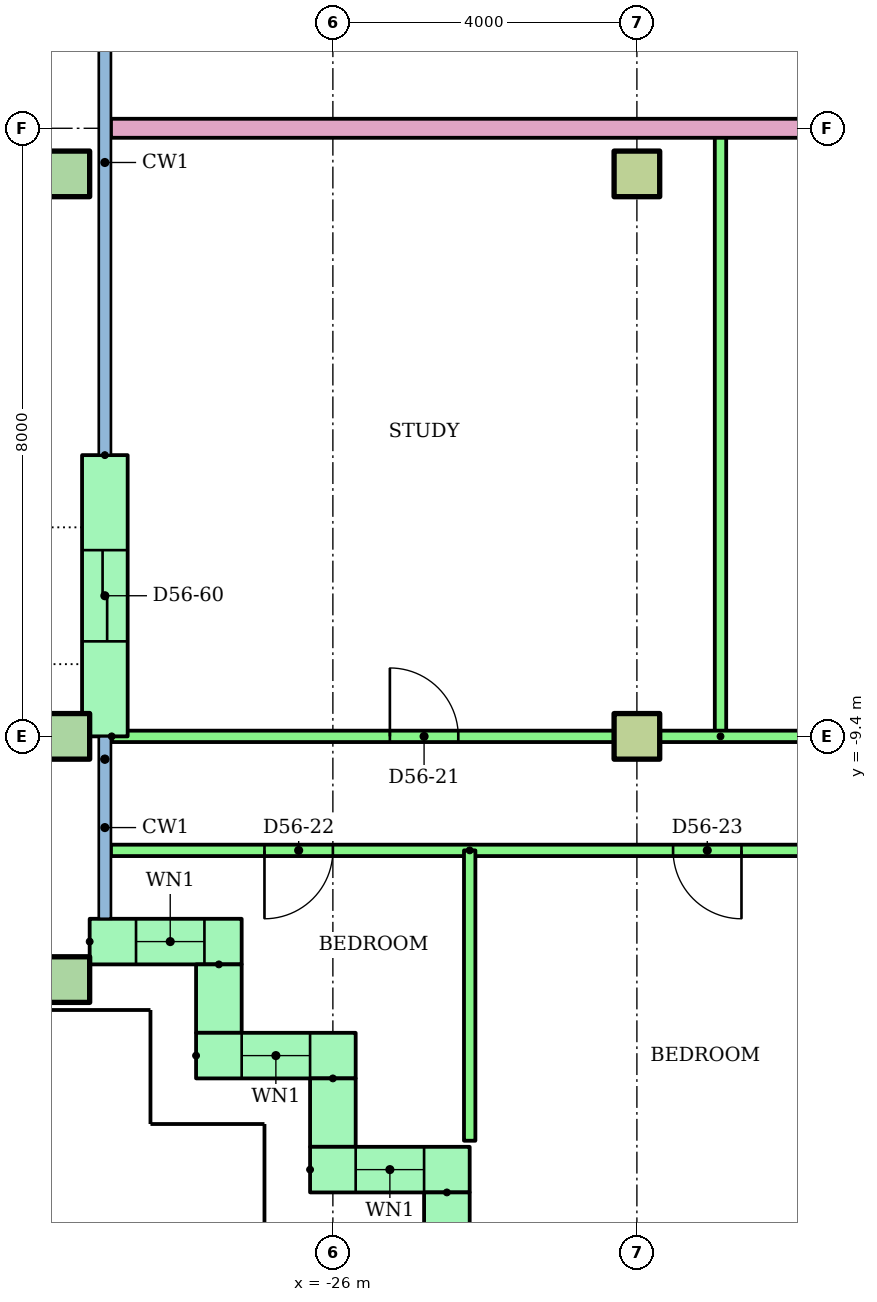
"""IFC4 building model, lengths in metres.
Left out: names, types, materials, properties, quantities, classifications, styles, units other than length and angle.
Written with IfcOpenShell. Run it as: python <this file> out.ifc"""

import sys

from ifc_helpers import new_model, si_unit, direction, frame, frame_2d, origin, origin_2d, place, context, subcontext, project, spatial, rectangle, hollow_rectangle, extrude, element, fill, save


model = new_model("IFC4")
c1 = context("Model", 3, precision=1e-05, world=origin(), true_north=direction((0.0, 1.0)))
c2 = subcontext(c1, "Body", "Model", "MODEL_VIEW")
j1 = project(units=[si_unit("LENGTHUNIT", "METRE"), si_unit("PLANEANGLEUNIT", "RADIAN")], contexts=[c1])
p1 = place(None, origin())
s1 = spatial("IfcSite", under=j1, at=p1, CompositionType="ELEMENT")
p2 = place(p1, origin())
s2 = spatial("IfcBuilding", under=s1, at=p2, CompositionType="ELEMENT")
p3 = place(p2, frame((0.0, 0.0, 217.2)))
s3 = spatial("IfcBuildingStorey", under=s2, at=p3, CompositionType="ELEMENT", Elevation=217.2)
for number, where in (
    (1, (-29.5, -12.6, 0.0)),
    (2, (-29.5, -9.4, 0.0)),
):
    element("IfcColumn", number, at=place(p3, frame(where)), inside=s3, PredefinedType="COLUMN", context=c2, shape_type="SweptSolid", body=[
        extrude(hollow_rectangle(XDim=0.6, YDim=0.6, WallThickness=0.03, at=origin_2d()), origin(), (0.0, 0.0, 1.0), 3.2),
    ])
p4 = place(p3, frame((-22.0, -9.4, 0.0)))
e3 = element("IfcColumn", 3, at=p4, inside=s3, PredefinedType="COLUMN", context=c2, shape_type="SweptSolid", body=[
    extrude(rectangle(XDim=0.6, YDim=0.6, at=origin_2d()), origin(), (0.0, 0.0, 1.0), 3.2),
])
p5 = place(p3, frame((-29.5, -2.0, 0.0)))
e4 = element("IfcColumn", 4, at=p5, inside=s3, PredefinedType="COLUMN", context=c2, shape_type="SweptSolid", body=[
    extrude(hollow_rectangle(XDim=0.6, YDim=0.6, WallThickness=0.03, at=origin_2d()), origin(), (0.0, 0.0, 1.0), 3.2),
])
p6 = place(p3, frame((-22.0, -2.0, 0.0)))
e5 = element("IfcColumn", 5, at=p6, inside=s3, PredefinedType="COLUMN", context=c2, shape_type="SweptSolid", body=[
    extrude(rectangle(XDim=0.6, YDim=0.6, at=origin_2d()), origin(), (0.0, 0.0, 1.0), 3.2),
])
p7 = place(p3, frame((-29.0, -5.7, 0.0), z_axis=(0.0, 0.0, 1.0), x_axis=(0.0, -1.0, 0.0)))
e6 = element("IfcWall", 6, at=p7, inside=s3, PredefinedType="STANDARD", context=c2, shape_type="SweptSolid", body=[
    extrude(rectangle(XDim=3.7, YDim=0.6, at=frame_2d((1.85, 0.0))), origin(), (0.0, 0.0, 1.0), 2.92),
])
p8 = place(p7, frame((1.25, 0.0, 0.0)))
e7 = element("IfcOpeningElement", 7, at=p8, cuts=e6, PredefinedType="OPENING", context=c2, shape_type="SweptSolid", body=[
    extrude(rectangle(XDim=1.2, YDim=2.1, at=frame_2d((0.6, 1.05))), frame((0.0, 0.31, 0.0), z_axis=(0.0, -1.0, 0.0), x_axis=(1.0, 0.0, 0.0)), (0.0, 0.0, 1.0), 0.62),
])
p9 = place(p3, frame((-29.2, -12.1, 0.0)))
e8 = element("IfcWall", 8, at=p9, inside=s3, PredefinedType="STANDARD", context=c2, shape_type="SweptSolid", body=[
    extrude(rectangle(XDim=2.0, YDim=0.6, at=frame_2d((1.0, 0.0))), origin(), (0.0, 0.0, 1.0), 2.92),
])
p10 = place(p9, frame((0.61, 0.0, 0.9)))
e9 = element("IfcOpeningElement", 9, at=p10, cuts=e8, PredefinedType="OPENING", context=c2, shape_type="SweptSolid", body=[
    extrude(rectangle(XDim=0.9, YDim=1.5, at=frame_2d((0.45, 0.75))), frame((0.0, 0.31, 0.0), z_axis=(0.0, -1.0, 0.0), x_axis=(1.0, 0.0, 0.0)), (0.0, 0.0, 1.0), 0.62),
])
p11 = place(p3, frame((-27.5, -12.4, 0.0), z_axis=(0.0, 0.0, 1.0), x_axis=(0.0, -1.0, 0.0)))
e10 = element("IfcWall", 10, at=p11, inside=s3, PredefinedType="STANDARD", context=c2, shape_type="SweptSolid", body=[
    extrude(rectangle(XDim=0.9, YDim=0.6, at=frame_2d((0.45, 0.0))), origin(), (0.0, 0.0, 1.0), 2.92),
])
p12 = place(p3, frame((-27.8, -13.6, 0.0)))
e11 = element("IfcWall", 11, at=p12, inside=s3, PredefinedType="STANDARD", context=c2, shape_type="SweptSolid", body=[
    extrude(rectangle(XDim=2.1, YDim=0.6, at=frame_2d((1.05, 0.0))), origin(), (0.0, 0.0, 1.0), 2.92),
])
p13 = place(p12, frame((0.6, 0.0, 0.9)))
e12 = element("IfcOpeningElement", 12, at=p13, cuts=e11, PredefinedType="OPENING", context=c2, shape_type="SweptSolid", body=[
    extrude(rectangle(XDim=0.9, YDim=1.5, at=frame_2d((0.45, 0.75))), frame((0.0, 0.31, 0.0), z_axis=(0.0, -1.0, 0.0), x_axis=(1.0, 0.0, 0.0)), (0.0, 0.0, 1.0), 0.62),
])
p14 = place(p3, frame((-26.0, -13.9, 0.0), z_axis=(0.0, 0.0, 1.0), x_axis=(0.0, -1.0, 0.0)))
e13 = element("IfcWall", 13, at=p14, inside=s3, PredefinedType="STANDARD", context=c2, shape_type="SweptSolid", body=[
    extrude(rectangle(XDim=0.9, YDim=0.6, at=frame_2d((0.45, 0.0))), origin(), (0.0, 0.0, 1.0), 2.92),
])
p15 = place(p3, frame((-26.3, -15.1, 0.0)))
e14 = element("IfcWall", 14, at=p15, inside=s3, PredefinedType="STANDARD", context=c2, shape_type="SweptSolid", body=[
    extrude(rectangle(XDim=2.1, YDim=0.6, at=frame_2d((1.05, 0.0))), origin(), (0.0, 0.0, 1.0), 2.92),
])
p16 = place(p15, frame((0.6, 0.0, 0.9)))
e15 = element("IfcOpeningElement", 15, at=p16, cuts=e14, PredefinedType="OPENING", context=c2, shape_type="SweptSolid", body=[
    extrude(rectangle(XDim=0.9, YDim=1.5, at=frame_2d((0.45, 0.75))), frame((0.0, 0.31, 0.0), z_axis=(0.0, -1.0, 0.0), x_axis=(1.0, 0.0, 0.0)), (0.0, 0.0, 1.0), 0.62),
])
p17 = place(p3, frame((-24.5, -15.4, 0.0), z_axis=(0.0, 0.0, 1.0), x_axis=(0.0, -1.0, 0.0)))
e16 = element("IfcWall", 16, at=p17, inside=s3, PredefinedType="STANDARD", context=c2, shape_type="SweptSolid", body=[
    extrude(rectangle(XDim=1.4, YDim=0.6, at=frame_2d((0.7, 0.0))), origin(), (0.0, 0.0, 1.0), 2.92),
])
p18 = place(p3, frame((-20.9, -9.4, 0.0), z_axis=(0.0, 0.0, 1.0), x_axis=(0.0, 1.0, 0.0)))
e17 = element("IfcWall", 17, at=p18, inside=s3, PredefinedType="PARTITIONING", context=c2, shape_type="SweptSolid", body=[
    extrude(rectangle(XDim=8.0, YDim=0.15, at=frame_2d((4.0, 0.0))), origin(), (0.0, 0.0, 1.0), 2.4),
])
p19 = place(p3, frame((-28.91, -9.4, 0.0)))
e18 = element("IfcWall", 18, at=p19, inside=s3, PredefinedType="PARTITIONING", context=c2, shape_type="SweptSolid", body=[
    extrude(rectangle(XDim=20.91, YDim=0.15, at=frame_2d((10.455, 0.0))), origin(), (0.0, 0.0, 1.0), 2.4),
])
p20 = place(p19, frame((15.81, 0.0, 0.0)))
e19 = element("IfcOpeningElement", 19, at=p20, cuts=e18, PredefinedType="OPENING", context=c2, shape_type="SweptSolid", body=[
    extrude(rectangle(XDim=0.9, YDim=2.1, at=frame_2d((0.45, 1.05))), frame((0.0, 0.085, 0.0), z_axis=(0.0, -1.0, 0.0), x_axis=(1.0, 0.0, 0.0)), (0.0, 0.0, 1.0), 0.17),
])
p21 = place(p19, frame((10.56, 0.0, 0.0)))
e20 = element("IfcOpeningElement", 20, at=p21, cuts=e18, PredefinedType="OPENING", context=c2, shape_type="SweptSolid", body=[
    extrude(rectangle(XDim=0.9, YDim=2.1, at=frame_2d((0.45, 1.05))), frame((0.0, 0.085, 0.0), z_axis=(0.0, -1.0, 0.0), x_axis=(1.0, 0.0, 0.0)), (0.0, 0.0, 1.0), 0.17),
])
p22 = place(p19, frame((3.66, 0.0, 0.0)))
e21 = element("IfcOpeningElement", 21, at=p22, cuts=e18, PredefinedType="OPENING", context=c2, shape_type="SweptSolid", body=[
    extrude(rectangle(XDim=0.9, YDim=2.1, at=frame_2d((0.45, 1.05))), frame((0.0, 0.085, 0.0), z_axis=(0.0, -1.0, 0.0), x_axis=(1.0, 0.0, 0.0)), (0.0, 0.0, 1.0), 0.17),
])
p23 = place(p3, frame((-6.0, -10.9, 0.0), z_axis=(0.0, 0.0, 1.0), x_axis=(-1.0, 0.0, 0.0)))
e22 = element("IfcWall", 22, at=p23, inside=s3, PredefinedType="PARTITIONING", context=c2, shape_type="SweptSolid", body=[
    extrude(rectangle(XDim=22.92, YDim=0.15, at=frame_2d((11.46, 0.0))), origin(), (0.0, 0.0, 1.0), 2.4),
])
p24 = place(p23, frame((20.0, 0.0, 0.0)))
e23 = element("IfcOpeningElement", 23, at=p24, cuts=e22, PredefinedType="OPENING", context=c2, shape_type="SweptSolid", body=[
    extrude(rectangle(XDim=0.9, YDim=2.1, at=frame_2d((0.45, 1.05))), frame((0.0, 0.085, 0.0), z_axis=(0.0, -1.0, 0.0), x_axis=(1.0, 0.0, 0.0)), (0.0, 0.0, 1.0), 0.17),
])
p25 = place(p23, frame((14.624, 0.0, 0.0)))
e24 = element("IfcOpeningElement", 24, at=p25, cuts=e22, PredefinedType="OPENING", context=c2, shape_type="SweptSolid", body=[
    extrude(rectangle(XDim=0.9, YDim=2.1, at=frame_2d((0.45, 1.05))), frame((0.0, 0.085, 0.0), z_axis=(0.0, -1.0, 0.0), x_axis=(1.0, 0.0, 0.0)), (0.0, 0.0, 1.0), 0.17),
])
p26 = place(p23, frame((9.55, 0.0, 0.0)))
e25 = element("IfcOpeningElement", 25, at=p26, cuts=e22, PredefinedType="OPENING", context=c2, shape_type="SweptSolid", body=[
    extrude(rectangle(XDim=0.9, YDim=2.1, at=frame_2d((0.45, 1.05))), frame((0.0, 0.085, 0.0), z_axis=(0.0, -1.0, 0.0), x_axis=(1.0, 0.0, 0.0)), (0.0, 0.0, 1.0), 0.17),
])
p27 = place(p23, frame((3.5, 0.0, 0.0)))
e26 = element("IfcOpeningElement", 26, at=p27, cuts=e22, PredefinedType="OPENING", context=c2, shape_type="SweptSolid", body=[
    extrude(rectangle(XDim=1.0, YDim=2.1, at=frame_2d((0.5, 1.05))), frame((0.0, 0.085, 0.0), z_axis=(0.0, -1.0, 0.0), x_axis=(1.0, 0.0, 0.0)), (0.0, 0.0, 1.0), 0.17),
])
p28 = place(p3, frame((-24.2, -10.9, 0.0), z_axis=(0.0, 0.0, 1.0), x_axis=(0.0, -1.0, 0.0)))
e27 = element("IfcWall", 27, at=p28, inside=s3, PredefinedType="PARTITIONING", context=c2, shape_type="SweptSolid", body=[
    extrude(rectangle(XDim=3.82, YDim=0.15, at=frame_2d((1.91, 0.0))), origin(), (0.0, 0.0, 1.0), 2.4),
])
p29 = place(p3, frame((-14.0, -1.4, 0.0), z_axis=(0.0, 0.0, 1.0), x_axis=(-1.0, 0.0, 0.0)))
e28 = element("IfcWall", 28, at=p29, inside=s3, PredefinedType="PARTITIONING", context=c2, shape_type="SweptSolid", body=[
    extrude(rectangle(XDim=14.92, YDim=0.25, at=frame_2d((7.46, 0.0))), origin(), (0.0, 0.0, 1.0), 2.4),
])
p30 = place(p10, origin())
e29 = element("IfcWindow", 29, at=p30, inside=s3, PartitioningType="SINGLE_PANEL", PredefinedType="WINDOW", context=c2, shape_type="SweptSolid", body=[
    extrude(rectangle(XDim=0.9, YDim=1.5, at=frame_2d((0.45, 0.75))), frame((0.0, 0.03, 0.0), z_axis=(0.0, -1.0, 0.0), x_axis=(1.0, 0.0, 0.0)), (0.0, 0.0, 1.0), 0.06),
])
fill(e9, e29)
p31 = place(p13, origin())
e30 = element("IfcWindow", 30, at=p31, inside=s3, PartitioningType="SINGLE_PANEL", PredefinedType="WINDOW", context=c2, shape_type="SweptSolid", body=[
    extrude(rectangle(XDim=0.9, YDim=1.5, at=frame_2d((0.45, 0.75))), frame((0.0, 0.03, 0.0), z_axis=(0.0, -1.0, 0.0), x_axis=(1.0, 0.0, 0.0)), (0.0, 0.0, 1.0), 0.06),
])
fill(e12, e30)
p32 = place(p16, origin())
e31 = element("IfcWindow", 31, at=p32, inside=s3, PartitioningType="SINGLE_PANEL", PredefinedType="WINDOW", context=c2, shape_type="SweptSolid", body=[
    extrude(rectangle(XDim=0.9, YDim=1.5, at=frame_2d((0.45, 0.75))), frame((0.0, 0.03, 0.0), z_axis=(0.0, -1.0, 0.0), x_axis=(1.0, 0.0, 0.0)), (0.0, 0.0, 1.0), 0.06),
])
fill(e15, e31)
p33 = place(p22, origin())
e32 = element("IfcDoor", 32, at=p33, inside=s3, OperationType="SINGLE_SWING_LEFT", PredefinedType="DOOR", context=c2, shape_type="SweptSolid", body=[
    extrude(rectangle(XDim=0.9, YDim=2.1, at=frame_2d((0.45, 1.05))), frame((0.0, 0.025, 0.0), z_axis=(0.0, -1.0, 0.0), x_axis=(1.0, 0.0, 0.0)), (0.0, 0.0, 1.0), 0.05),
])
fill(e21, e32)
p34 = place(p24, origin())
e33 = element("IfcDoor", 33, at=p34, inside=s3, OperationType="SINGLE_SWING_RIGHT", PredefinedType="DOOR", context=c2, shape_type="SweptSolid", body=[
    extrude(rectangle(XDim=0.9, YDim=2.1, at=frame_2d((0.45, 1.05))), frame((0.0, 0.025, 0.0), z_axis=(0.0, -1.0, 0.0), x_axis=(1.0, 0.0, 0.0)), (0.0, 0.0, 1.0), 0.05),
])
fill(e23, e33)
p35 = place(p25, origin())
e34 = element("IfcDoor", 34, at=p35, inside=s3, OperationType="SINGLE_SWING_LEFT", PredefinedType="DOOR", context=c2, shape_type="SweptSolid", body=[
    extrude(rectangle(XDim=0.9, YDim=2.1, at=frame_2d((0.45, 1.05))), frame((0.0, 0.025, 0.0), z_axis=(0.0, -1.0, 0.0), x_axis=(1.0, 0.0, 0.0)), (0.0, 0.0, 1.0), 0.05),
])
fill(e24, e34)
p36 = place(p8, origin())
e35 = element("IfcDoor", 35, at=p36, inside=s3, OperationType="SLIDING_TO_LEFT", PredefinedType="DOOR", context=c2, shape_type="SweptSolid", body=[
    extrude(rectangle(XDim=1.2, YDim=2.1, at=frame_2d((0.6, 1.05))), frame((0.0, 0.025, 0.0), z_axis=(0.0, -1.0, 0.0), x_axis=(1.0, 0.0, 0.0)), (0.0, 0.0, 1.0), 0.05),
])
fill(e7, e35)
save(model, sys.argv[1])
